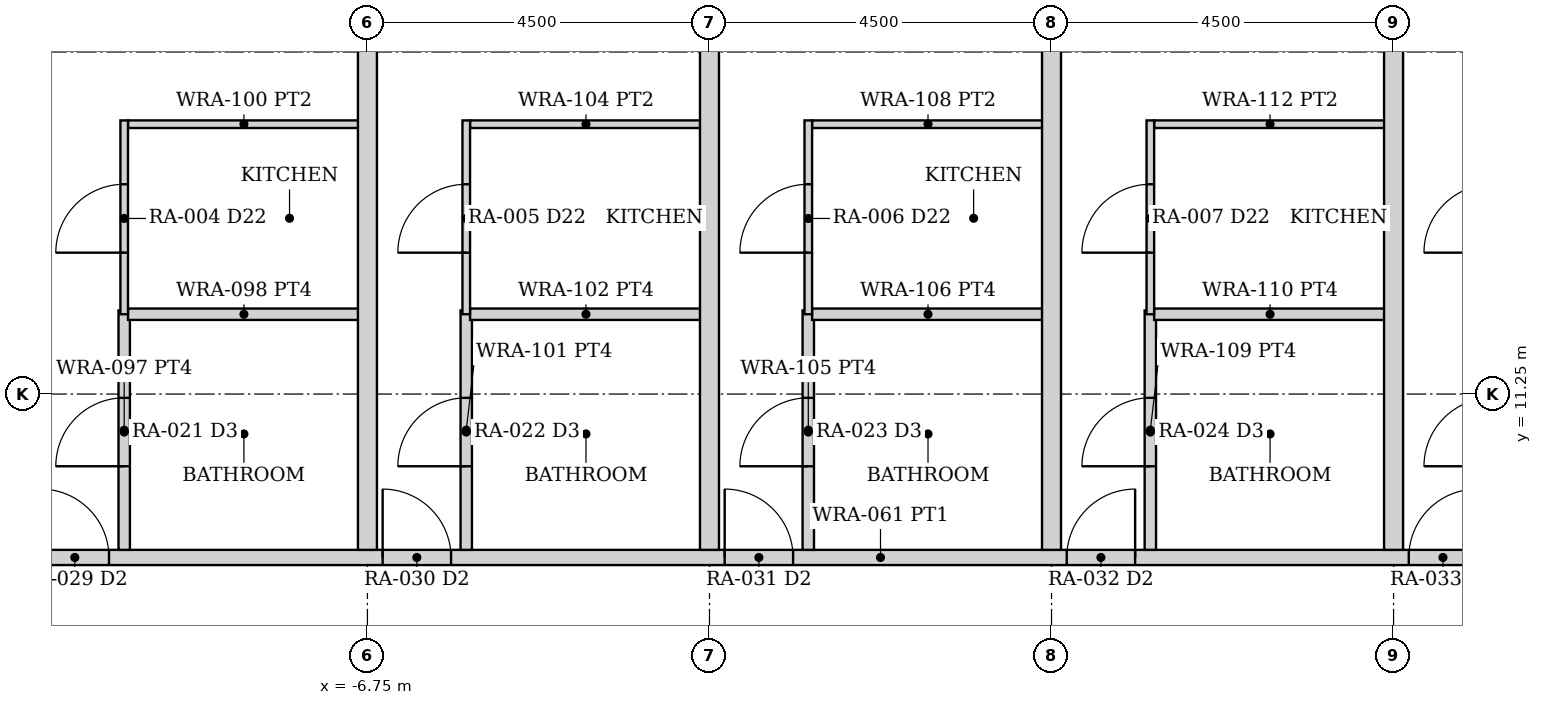
"""IFC4 building model, lengths in metres.
Left out: names, types, materials, properties, quantities, classifications, styles, units other than length and angle.
Written with IfcOpenShell. Run it as: python <this file> out.ifc"""

import sys

from ifc_helpers import new_model, si_unit, direction, frame, frame_2d, origin, place, context, subcontext, project, spatial, rectangle, extrude, element, fill, save


model = new_model("IFC4")
c1 = context("Model", 3, precision=1e-05, world=origin(), true_north=direction((0.0, 1.0)))
c2 = subcontext(c1, "Body", "Model", "MODEL_VIEW")
j1 = project(units=[si_unit("LENGTHUNIT", "METRE"), si_unit("PLANEANGLEUNIT", "RADIAN")], contexts=[c1])
p1 = place(None, origin())
s1 = spatial("IfcSite", under=j1, at=p1, CompositionType="ELEMENT")
p2 = place(p1, origin())
s2 = spatial("IfcBuilding", under=s1, at=p2, CompositionType="ELEMENT")
p3 = place(p2, frame((0.0, 0.0, 26.5)))
s3 = spatial("IfcBuildingStorey", under=s2, at=p3, CompositionType="ELEMENT", Elevation=26.5)
p4 = place(p3, frame((-24.55, 9.1, 0.0), z_axis=(0.0, 0.0, 1.0), x_axis=(1.0, 0.0, 0.0)))
e1 = element("IfcWall", 1, at=p4, inside=s3, PredefinedType="PARTITIONING", context=c2, shape_type="SweptSolid", body=[
    extrude(rectangle(XDim=49.1, YDim=0.2, at=frame_2d((24.55, 0.0))), origin(), (0.0, 0.0, 1.0), 2.373),
])
p5 = place(p4, frame((5.1, 0.0, 0.0)))
e2 = element("IfcOpeningElement", 2, at=p5, cuts=e1, PredefinedType="OPENING", context=c2, shape_type="SweptSolid", body=[
    extrude(rectangle(XDim=0.9, YDim=2.1, at=frame_2d((0.45, 1.05))), frame((0.0, 0.11, 0.0), z_axis=(0.0, -1.0, 0.0), x_axis=(1.0, 0.0, 0.0)), (0.0, 0.0, 1.0), 0.22),
])
p6 = place(p4, frame((9.0, 0.0, 0.0)))
e3 = element("IfcOpeningElement", 3, at=p6, cuts=e1, PredefinedType="OPENING", context=c2, shape_type="SweptSolid", body=[
    extrude(rectangle(XDim=0.9, YDim=2.1, at=frame_2d((0.45, 1.05))), frame((0.0, 0.11, 0.0), z_axis=(0.0, -1.0, 0.0), x_axis=(1.0, 0.0, 0.0)), (0.0, 0.0, 1.0), 0.22),
])
p7 = place(p4, frame((13.5, 0.0, 0.0)))
e4 = element("IfcOpeningElement", 4, at=p7, cuts=e1, PredefinedType="OPENING", context=c2, shape_type="SweptSolid", body=[
    extrude(rectangle(XDim=0.9, YDim=2.1, at=frame_2d((0.45, 1.05))), frame((0.0, 0.11, 0.0), z_axis=(0.0, -1.0, 0.0), x_axis=(1.0, 0.0, 0.0)), (0.0, 0.0, 1.0), 0.22),
])
p8 = place(p4, frame((18.0, 0.0, 0.0)))
e5 = element("IfcOpeningElement", 5, at=p8, cuts=e1, PredefinedType="OPENING", context=c2, shape_type="SweptSolid", body=[
    extrude(rectangle(XDim=0.9, YDim=2.1, at=frame_2d((0.45, 1.05))), frame((0.0, 0.11, 0.0), z_axis=(0.0, -1.0, 0.0), x_axis=(1.0, 0.0, 0.0)), (0.0, 0.0, 1.0), 0.22),
])
p9 = place(p4, frame((22.5, 0.0, 0.0)))
e6 = element("IfcOpeningElement", 6, at=p9, cuts=e1, PredefinedType="OPENING", context=c2, shape_type="SweptSolid", body=[
    extrude(rectangle(XDim=0.9, YDim=2.1, at=frame_2d((0.45, 1.05))), frame((0.0, 0.11, 0.0), z_axis=(0.0, -1.0, 0.0), x_axis=(1.0, 0.0, 0.0)), (0.0, 0.0, 1.0), 0.22),
])
p10 = place(p4, frame((27.0, 0.0, 0.0)))
e7 = element("IfcOpeningElement", 7, at=p10, cuts=e1, PredefinedType="OPENING", context=c2, shape_type="SweptSolid", body=[
    extrude(rectangle(XDim=0.9, YDim=2.1, at=frame_2d((0.45, 1.05))), frame((0.0, 0.11, 0.0), z_axis=(0.0, -1.0, 0.0), x_axis=(1.0, 0.0, 0.0)), (0.0, 0.0, 1.0), 0.22),
])
p11 = place(p4, frame((31.5, 0.0, 0.0)))
e8 = element("IfcOpeningElement", 8, at=p11, cuts=e1, PredefinedType="OPENING", context=c2, shape_type="SweptSolid", body=[
    extrude(rectangle(XDim=0.9, YDim=2.1, at=frame_2d((0.45, 1.05))), frame((0.0, 0.11, 0.0), z_axis=(0.0, -1.0, 0.0), x_axis=(1.0, 0.0, 0.0)), (0.0, 0.0, 1.0), 0.22),
])
p12 = place(p4, frame((36.0, 0.0, 0.0)))
e9 = element("IfcOpeningElement", 9, at=p12, cuts=e1, PredefinedType="OPENING", context=c2, shape_type="SweptSolid", body=[
    extrude(rectangle(XDim=0.9, YDim=2.1, at=frame_2d((0.45, 1.05))), frame((0.0, 0.11, 0.0), z_axis=(0.0, -1.0, 0.0), x_axis=(1.0, 0.0, 0.0)), (0.0, 0.0, 1.0), 0.22),
])
p13 = place(p4, frame((43.1, 0.0, 0.0)))
e10 = element("IfcOpeningElement", 10, at=p13, cuts=e1, PredefinedType="OPENING", context=c2, shape_type="SweptSolid", body=[
    extrude(rectangle(XDim=0.9, YDim=2.1, at=frame_2d((0.45, 1.05))), frame((0.0, 0.11, 0.0), z_axis=(0.0, -1.0, 0.0), x_axis=(1.0, 0.0, 0.0)), (0.0, 0.0, 1.0), 0.22),
])
p14 = place(p3, frame((-9.95, 9.2, 0.0), z_axis=(0.0, 0.0, 1.0), x_axis=(0.0, 1.0, 0.0)))
e11 = element("IfcWall", 11, at=p14, inside=s3, PredefinedType="PARTITIONING", context=c2, shape_type="SweptSolid", body=[
    extrude(rectangle(XDim=3.15, YDim=0.15, at=frame_2d((1.575, 0.0))), origin(), (0.0, 0.0, 1.0), 2.373),
])
p15 = place(p14, frame((1.1, 0.0, 0.0)))
e12 = element("IfcOpeningElement", 12, at=p15, cuts=e11, PredefinedType="OPENING", context=c2, shape_type="SweptSolid", body=[
    extrude(rectangle(XDim=0.9, YDim=2.1, at=frame_2d((0.45, 1.05))), frame((0.0, 0.085, 0.0), z_axis=(0.0, -1.0, 0.0), x_axis=(1.0, 0.0, 0.0)), (0.0, 0.0, 1.0), 0.17),
])
p16 = place(p3, frame((-9.9, 12.3, 0.0), z_axis=(0.0, 0.0, 1.0), x_axis=(1.0, 0.0, 0.0)))
e13 = element("IfcWall", 13, at=p16, inside=s3, PredefinedType="PARTITIONING", context=c2, shape_type="SweptSolid", body=[
    extrude(rectangle(XDim=3.05, YDim=0.15, at=frame_2d((1.525, 0.0))), origin(), (0.0, 0.0, 1.0), 2.373),
])
p17 = place(p3, frame((-9.9, 14.8, 0.0), z_axis=(0.0, 0.0, 1.0), x_axis=(1.0, 0.0, 0.0)))
e14 = element("IfcWall", 14, at=p17, inside=s3, PredefinedType="PARTITIONING", context=c2, shape_type="SweptSolid", body=[
    extrude(rectangle(XDim=3.05, YDim=0.1, at=frame_2d((1.525, 0.0))), origin(), (0.0, 0.0, 1.0), 2.373),
])
p18 = place(p3, frame((-9.95, 12.3, 0.0), z_axis=(0.0, 0.0, 1.0), x_axis=(0.0, 1.0, 0.0)))
e15 = element("IfcWall", 15, at=p18, inside=s3, PredefinedType="PARTITIONING", context=c2, shape_type="SweptSolid", body=[
    extrude(rectangle(XDim=2.55, YDim=0.1, at=frame_2d((1.275, 0.0))), origin(), (0.0, 0.0, 1.0), 2.373),
])
p19 = place(p18, frame((0.81, 0.0, 0.0)))
e16 = element("IfcOpeningElement", 16, at=p19, cuts=e15, PredefinedType="OPENING", context=c2, shape_type="SweptSolid", body=[
    extrude(rectangle(XDim=0.9, YDim=2.1, at=frame_2d((0.45, 1.05))), frame((0.0, 0.06, 0.0), z_axis=(0.0, -1.0, 0.0), x_axis=(1.0, 0.0, 0.0)), (0.0, 0.0, 1.0), 0.12),
])
p20 = place(p3, frame((-5.45, 9.2, 0.0), z_axis=(0.0, 0.0, 1.0), x_axis=(0.0, 1.0, 0.0)))
e17 = element("IfcWall", 17, at=p20, inside=s3, PredefinedType="PARTITIONING", context=c2, shape_type="SweptSolid", body=[
    extrude(rectangle(XDim=3.15, YDim=0.15, at=frame_2d((1.575, 0.0))), origin(), (0.0, 0.0, 1.0), 2.373),
])
p21 = place(p20, frame((1.1, 0.0, 0.0)))
e18 = element("IfcOpeningElement", 18, at=p21, cuts=e17, PredefinedType="OPENING", context=c2, shape_type="SweptSolid", body=[
    extrude(rectangle(XDim=0.9, YDim=2.1, at=frame_2d((0.45, 1.05))), frame((0.0, 0.085, 0.0), z_axis=(0.0, -1.0, 0.0), x_axis=(1.0, 0.0, 0.0)), (0.0, 0.0, 1.0), 0.17),
])
p22 = place(p3, frame((-5.4, 12.3, 0.0), z_axis=(0.0, 0.0, 1.0), x_axis=(1.0, 0.0, 0.0)))
e19 = element("IfcWall", 19, at=p22, inside=s3, PredefinedType="PARTITIONING", context=c2, shape_type="SweptSolid", body=[
    extrude(rectangle(XDim=3.05, YDim=0.15, at=frame_2d((1.525, 0.0))), origin(), (0.0, 0.0, 1.0), 2.373),
])
p23 = place(p3, frame((-5.4, 14.8, 0.0), z_axis=(0.0, 0.0, 1.0), x_axis=(1.0, 0.0, 0.0)))
e20 = element("IfcWall", 20, at=p23, inside=s3, PredefinedType="PARTITIONING", context=c2, shape_type="SweptSolid", body=[
    extrude(rectangle(XDim=3.05, YDim=0.1, at=frame_2d((1.525, 0.0))), origin(), (0.0, 0.0, 1.0), 2.373),
])
p24 = place(p3, frame((-5.45, 12.3, 0.0), z_axis=(0.0, 0.0, 1.0), x_axis=(0.0, 1.0, 0.0)))
e21 = element("IfcWall", 21, at=p24, inside=s3, PredefinedType="PARTITIONING", context=c2, shape_type="SweptSolid", body=[
    extrude(rectangle(XDim=2.55, YDim=0.1, at=frame_2d((1.275, 0.0))), origin(), (0.0, 0.0, 1.0), 2.373),
])
p25 = place(p24, frame((0.81, 0.0, 0.0)))
e22 = element("IfcOpeningElement", 22, at=p25, cuts=e21, PredefinedType="OPENING", context=c2, shape_type="SweptSolid", body=[
    extrude(rectangle(XDim=0.9, YDim=2.1, at=frame_2d((0.45, 1.05))), frame((0.0, 0.06, 0.0), z_axis=(0.0, -1.0, 0.0), x_axis=(1.0, 0.0, 0.0)), (0.0, 0.0, 1.0), 0.12),
])
p26 = place(p3, frame((-0.95, 9.2, 0.0), z_axis=(0.0, 0.0, 1.0), x_axis=(0.0, 1.0, 0.0)))
e23 = element("IfcWall", 23, at=p26, inside=s3, PredefinedType="PARTITIONING", context=c2, shape_type="SweptSolid", body=[
    extrude(rectangle(XDim=3.15, YDim=0.15, at=frame_2d((1.575, 0.0))), origin(), (0.0, 0.0, 1.0), 2.373),
])
p27 = place(p26, frame((1.1, 0.0, 0.0)))
e24 = element("IfcOpeningElement", 24, at=p27, cuts=e23, PredefinedType="OPENING", context=c2, shape_type="SweptSolid", body=[
    extrude(rectangle(XDim=0.9, YDim=2.1, at=frame_2d((0.45, 1.05))), frame((0.0, 0.085, 0.0), z_axis=(0.0, -1.0, 0.0), x_axis=(1.0, 0.0, 0.0)), (0.0, 0.0, 1.0), 0.17),
])
p28 = place(p3, frame((-0.9, 12.3, 0.0), z_axis=(0.0, 0.0, 1.0), x_axis=(1.0, 0.0, 0.0)))
e25 = element("IfcWall", 25, at=p28, inside=s3, PredefinedType="PARTITIONING", context=c2, shape_type="SweptSolid", body=[
    extrude(rectangle(XDim=3.05, YDim=0.15, at=frame_2d((1.525, 0.0))), origin(), (0.0, 0.0, 1.0), 2.373),
])
p29 = place(p3, frame((-0.9, 14.8, 0.0), z_axis=(0.0, 0.0, 1.0), x_axis=(1.0, 0.0, 0.0)))
e26 = element("IfcWall", 26, at=p29, inside=s3, PredefinedType="PARTITIONING", context=c2, shape_type="SweptSolid", body=[
    extrude(rectangle(XDim=3.05, YDim=0.1, at=frame_2d((1.525, 0.0))), origin(), (0.0, 0.0, 1.0), 2.373),
])
p30 = place(p3, frame((-0.95, 12.3, 0.0), z_axis=(0.0, 0.0, 1.0), x_axis=(0.0, 1.0, 0.0)))
e27 = element("IfcWall", 27, at=p30, inside=s3, PredefinedType="PARTITIONING", context=c2, shape_type="SweptSolid", body=[
    extrude(rectangle(XDim=2.55, YDim=0.1, at=frame_2d((1.275, 0.0))), origin(), (0.0, 0.0, 1.0), 2.373),
])
p31 = place(p30, frame((0.81, 0.0, 0.0)))
e28 = element("IfcOpeningElement", 28, at=p31, cuts=e27, PredefinedType="OPENING", context=c2, shape_type="SweptSolid", body=[
    extrude(rectangle(XDim=0.9, YDim=2.1, at=frame_2d((0.45, 1.05))), frame((0.0, 0.06, 0.0), z_axis=(0.0, -1.0, 0.0), x_axis=(1.0, 0.0, 0.0)), (0.0, 0.0, 1.0), 0.12),
])
p32 = place(p3, frame((3.55, 9.2, 0.0), z_axis=(0.0, 0.0, 1.0), x_axis=(0.0, 1.0, 0.0)))
e29 = element("IfcWall", 29, at=p32, inside=s3, PredefinedType="PARTITIONING", context=c2, shape_type="SweptSolid", body=[
    extrude(rectangle(XDim=3.15, YDim=0.15, at=frame_2d((1.575, 0.0))), origin(), (0.0, 0.0, 1.0), 2.373),
])
p33 = place(p32, frame((1.1, 0.0, 0.0)))
e30 = element("IfcOpeningElement", 30, at=p33, cuts=e29, PredefinedType="OPENING", context=c2, shape_type="SweptSolid", body=[
    extrude(rectangle(XDim=0.9, YDim=2.1, at=frame_2d((0.45, 1.05))), frame((0.0, 0.085, 0.0), z_axis=(0.0, -1.0, 0.0), x_axis=(1.0, 0.0, 0.0)), (0.0, 0.0, 1.0), 0.17),
])
p34 = place(p3, frame((3.6, 12.3, 0.0), z_axis=(0.0, 0.0, 1.0), x_axis=(1.0, 0.0, 0.0)))
e31 = element("IfcWall", 31, at=p34, inside=s3, PredefinedType="PARTITIONING", context=c2, shape_type="SweptSolid", body=[
    extrude(rectangle(XDim=3.05, YDim=0.15, at=frame_2d((1.525, 0.0))), origin(), (0.0, 0.0, 1.0), 2.373),
])
p35 = place(p3, frame((3.6, 14.8, 0.0), z_axis=(0.0, 0.0, 1.0), x_axis=(1.0, 0.0, 0.0)))
e32 = element("IfcWall", 32, at=p35, inside=s3, PredefinedType="PARTITIONING", context=c2, shape_type="SweptSolid", body=[
    extrude(rectangle(XDim=3.05, YDim=0.1, at=frame_2d((1.525, 0.0))), origin(), (0.0, 0.0, 1.0), 2.373),
])
p36 = place(p3, frame((3.55, 12.3, 0.0), z_axis=(0.0, 0.0, 1.0), x_axis=(0.0, 1.0, 0.0)))
e33 = element("IfcWall", 33, at=p36, inside=s3, PredefinedType="PARTITIONING", context=c2, shape_type="SweptSolid", body=[
    extrude(rectangle(XDim=2.55, YDim=0.1, at=frame_2d((1.275, 0.0))), origin(), (0.0, 0.0, 1.0), 2.373),
])
p37 = place(p36, frame((0.81, 0.0, 0.0)))
e34 = element("IfcOpeningElement", 34, at=p37, cuts=e33, PredefinedType="OPENING", context=c2, shape_type="SweptSolid", body=[
    extrude(rectangle(XDim=0.9, YDim=2.1, at=frame_2d((0.45, 1.05))), frame((0.0, 0.06, 0.0), z_axis=(0.0, -1.0, 0.0), x_axis=(1.0, 0.0, 0.0)), (0.0, 0.0, 1.0), 0.12),
])
for number, where, z_axis, x_axis in (
    (35, (-6.75, 9.2, 0.0), (0.0, 0.0, 1.0), (0.0, 1.0, 0.0)),
    (36, (-2.25, 9.2, 0.0), (0.0, 0.0, 1.0), (0.0, 1.0, 0.0)),
    (37, (2.25, 9.2, 0.0), (0.0, 0.0, 1.0), (0.0, 1.0, 0.0)),
    (38, (6.75, 9.2, 0.0), (0.0, 0.0, 1.0), (0.0, 1.0, 0.0)),
):
    element("IfcWall", number, at=place(p3, frame(where, z_axis=z_axis, x_axis=x_axis)), inside=s3, PredefinedType="PARTITIONING", context=c2, shape_type="SweptSolid", body=[
        extrude(rectangle(XDim=15.15, YDim=0.25, at=frame_2d((7.575, 0.0))), origin(), (0.0, 0.0, 1.0), 2.373),
    ])
p38 = place(p7, origin())
e39 = element("IfcDoor", 39, at=p38, inside=s3, OperationType="SINGLE_SWING_LEFT", PredefinedType="DOOR", context=c2, shape_type="SweptSolid", body=[
    extrude(rectangle(XDim=0.9, YDim=2.1, at=frame_2d((0.45, 1.05))), frame((0.0, 0.025, 0.0), z_axis=(0.0, -1.0, 0.0), x_axis=(1.0, 0.0, 0.0)), (0.0, 0.0, 1.0), 0.05),
])
fill(e4, e39)
p39 = place(p15, origin())
e40 = element("IfcDoor", 40, at=p39, inside=s3, OperationType="SINGLE_SWING_LEFT", PredefinedType="DOOR", context=c2, shape_type="SweptSolid", body=[
    extrude(rectangle(XDim=0.9, YDim=2.1, at=frame_2d((0.45, 1.05))), frame((0.0, 0.025, 0.0), z_axis=(0.0, -1.0, 0.0), x_axis=(1.0, 0.0, 0.0)), (0.0, 0.0, 1.0), 0.05),
])
fill(e12, e40)
p40 = place(p19, origin())
e41 = element("IfcDoor", 41, at=p40, inside=s3, OperationType="SINGLE_SWING_LEFT", PredefinedType="DOOR", context=c2, shape_type="SweptSolid", body=[
    extrude(rectangle(XDim=0.9, YDim=2.1, at=frame_2d((0.45, 1.05))), frame((0.0, 0.025, 0.0), z_axis=(0.0, -1.0, 0.0), x_axis=(1.0, 0.0, 0.0)), (0.0, 0.0, 1.0), 0.05),
])
fill(e16, e41)
p41 = place(p8, origin())
e42 = element("IfcDoor", 42, at=p41, inside=s3, OperationType="SINGLE_SWING_LEFT", PredefinedType="DOOR", context=c2, shape_type="SweptSolid", body=[
    extrude(rectangle(XDim=0.9, YDim=2.1, at=frame_2d((0.45, 1.05))), frame((0.0, 0.025, 0.0), z_axis=(0.0, -1.0, 0.0), x_axis=(1.0, 0.0, 0.0)), (0.0, 0.0, 1.0), 0.05),
])
fill(e5, e42)
p42 = place(p21, origin())
e43 = element("IfcDoor", 43, at=p42, inside=s3, OperationType="SINGLE_SWING_LEFT", PredefinedType="DOOR", context=c2, shape_type="SweptSolid", body=[
    extrude(rectangle(XDim=0.9, YDim=2.1, at=frame_2d((0.45, 1.05))), frame((0.0, 0.025, 0.0), z_axis=(0.0, -1.0, 0.0), x_axis=(1.0, 0.0, 0.0)), (0.0, 0.0, 1.0), 0.05),
])
fill(e18, e43)
p43 = place(p25, origin())
e44 = element("IfcDoor", 44, at=p43, inside=s3, OperationType="SINGLE_SWING_LEFT", PredefinedType="DOOR", context=c2, shape_type="SweptSolid", body=[
    extrude(rectangle(XDim=0.9, YDim=2.1, at=frame_2d((0.45, 1.05))), frame((0.0, 0.025, 0.0), z_axis=(0.0, -1.0, 0.0), x_axis=(1.0, 0.0, 0.0)), (0.0, 0.0, 1.0), 0.05),
])
fill(e22, e44)
p44 = place(p9, origin())
e45 = element("IfcDoor", 45, at=p44, inside=s3, OperationType="SINGLE_SWING_LEFT", PredefinedType="DOOR", context=c2, shape_type="SweptSolid", body=[
    extrude(rectangle(XDim=0.9, YDim=2.1, at=frame_2d((0.45, 1.05))), frame((0.0, 0.025, 0.0), z_axis=(0.0, -1.0, 0.0), x_axis=(1.0, 0.0, 0.0)), (0.0, 0.0, 1.0), 0.05),
])
fill(e6, e45)
p45 = place(p27, origin())
e46 = element("IfcDoor", 46, at=p45, inside=s3, OperationType="SINGLE_SWING_LEFT", PredefinedType="DOOR", context=c2, shape_type="SweptSolid", body=[
    extrude(rectangle(XDim=0.9, YDim=2.1, at=frame_2d((0.45, 1.05))), frame((0.0, 0.025, 0.0), z_axis=(0.0, -1.0, 0.0), x_axis=(1.0, 0.0, 0.0)), (0.0, 0.0, 1.0), 0.05),
])
fill(e24, e46)
p46 = place(p31, origin())
e47 = element("IfcDoor", 47, at=p46, inside=s3, OperationType="SINGLE_SWING_LEFT", PredefinedType="DOOR", context=c2, shape_type="SweptSolid", body=[
    extrude(rectangle(XDim=0.9, YDim=2.1, at=frame_2d((0.45, 1.05))), frame((0.0, 0.025, 0.0), z_axis=(0.0, -1.0, 0.0), x_axis=(1.0, 0.0, 0.0)), (0.0, 0.0, 1.0), 0.05),
])
fill(e28, e47)
p47 = place(p10, origin())
e48 = element("IfcDoor", 48, at=p47, inside=s3, OperationType="SINGLE_SWING_RIGHT", PredefinedType="DOOR", context=c2, shape_type="SweptSolid", body=[
    extrude(rectangle(XDim=0.9, YDim=2.1, at=frame_2d((0.45, 1.05))), frame((0.0, 0.025, 0.0), z_axis=(0.0, -1.0, 0.0), x_axis=(1.0, 0.0, 0.0)), (0.0, 0.0, 1.0), 0.05),
])
fill(e7, e48)
p48 = place(p33, origin())
e49 = element("IfcDoor", 49, at=p48, inside=s3, OperationType="SINGLE_SWING_LEFT", PredefinedType="DOOR", context=c2, shape_type="SweptSolid", body=[
    extrude(rectangle(XDim=0.9, YDim=2.1, at=frame_2d((0.45, 1.05))), frame((0.0, 0.025, 0.0), z_axis=(0.0, -1.0, 0.0), x_axis=(1.0, 0.0, 0.0)), (0.0, 0.0, 1.0), 0.05),
])
fill(e30, e49)
p49 = place(p37, origin())
e50 = element("IfcDoor", 50, at=p49, inside=s3, OperationType="SINGLE_SWING_LEFT", PredefinedType="DOOR", context=c2, shape_type="SweptSolid", body=[
    extrude(rectangle(XDim=0.9, YDim=2.1, at=frame_2d((0.45, 1.05))), frame((0.0, 0.025, 0.0), z_axis=(0.0, -1.0, 0.0), x_axis=(1.0, 0.0, 0.0)), (0.0, 0.0, 1.0), 0.05),
])
fill(e34, e50)
p50 = place(p11, origin())
e51 = element("IfcDoor", 51, at=p50, inside=s3, OperationType="SINGLE_SWING_RIGHT", PredefinedType="DOOR", context=c2, shape_type="SweptSolid", body=[
    extrude(rectangle(XDim=0.9, YDim=2.1, at=frame_2d((0.45, 1.05))), frame((0.0, 0.025, 0.0), z_axis=(0.0, -1.0, 0.0), x_axis=(1.0, 0.0, 0.0)), (0.0, 0.0, 1.0), 0.05),
])
fill(e8, e51)
save(model, sys.argv[1])
